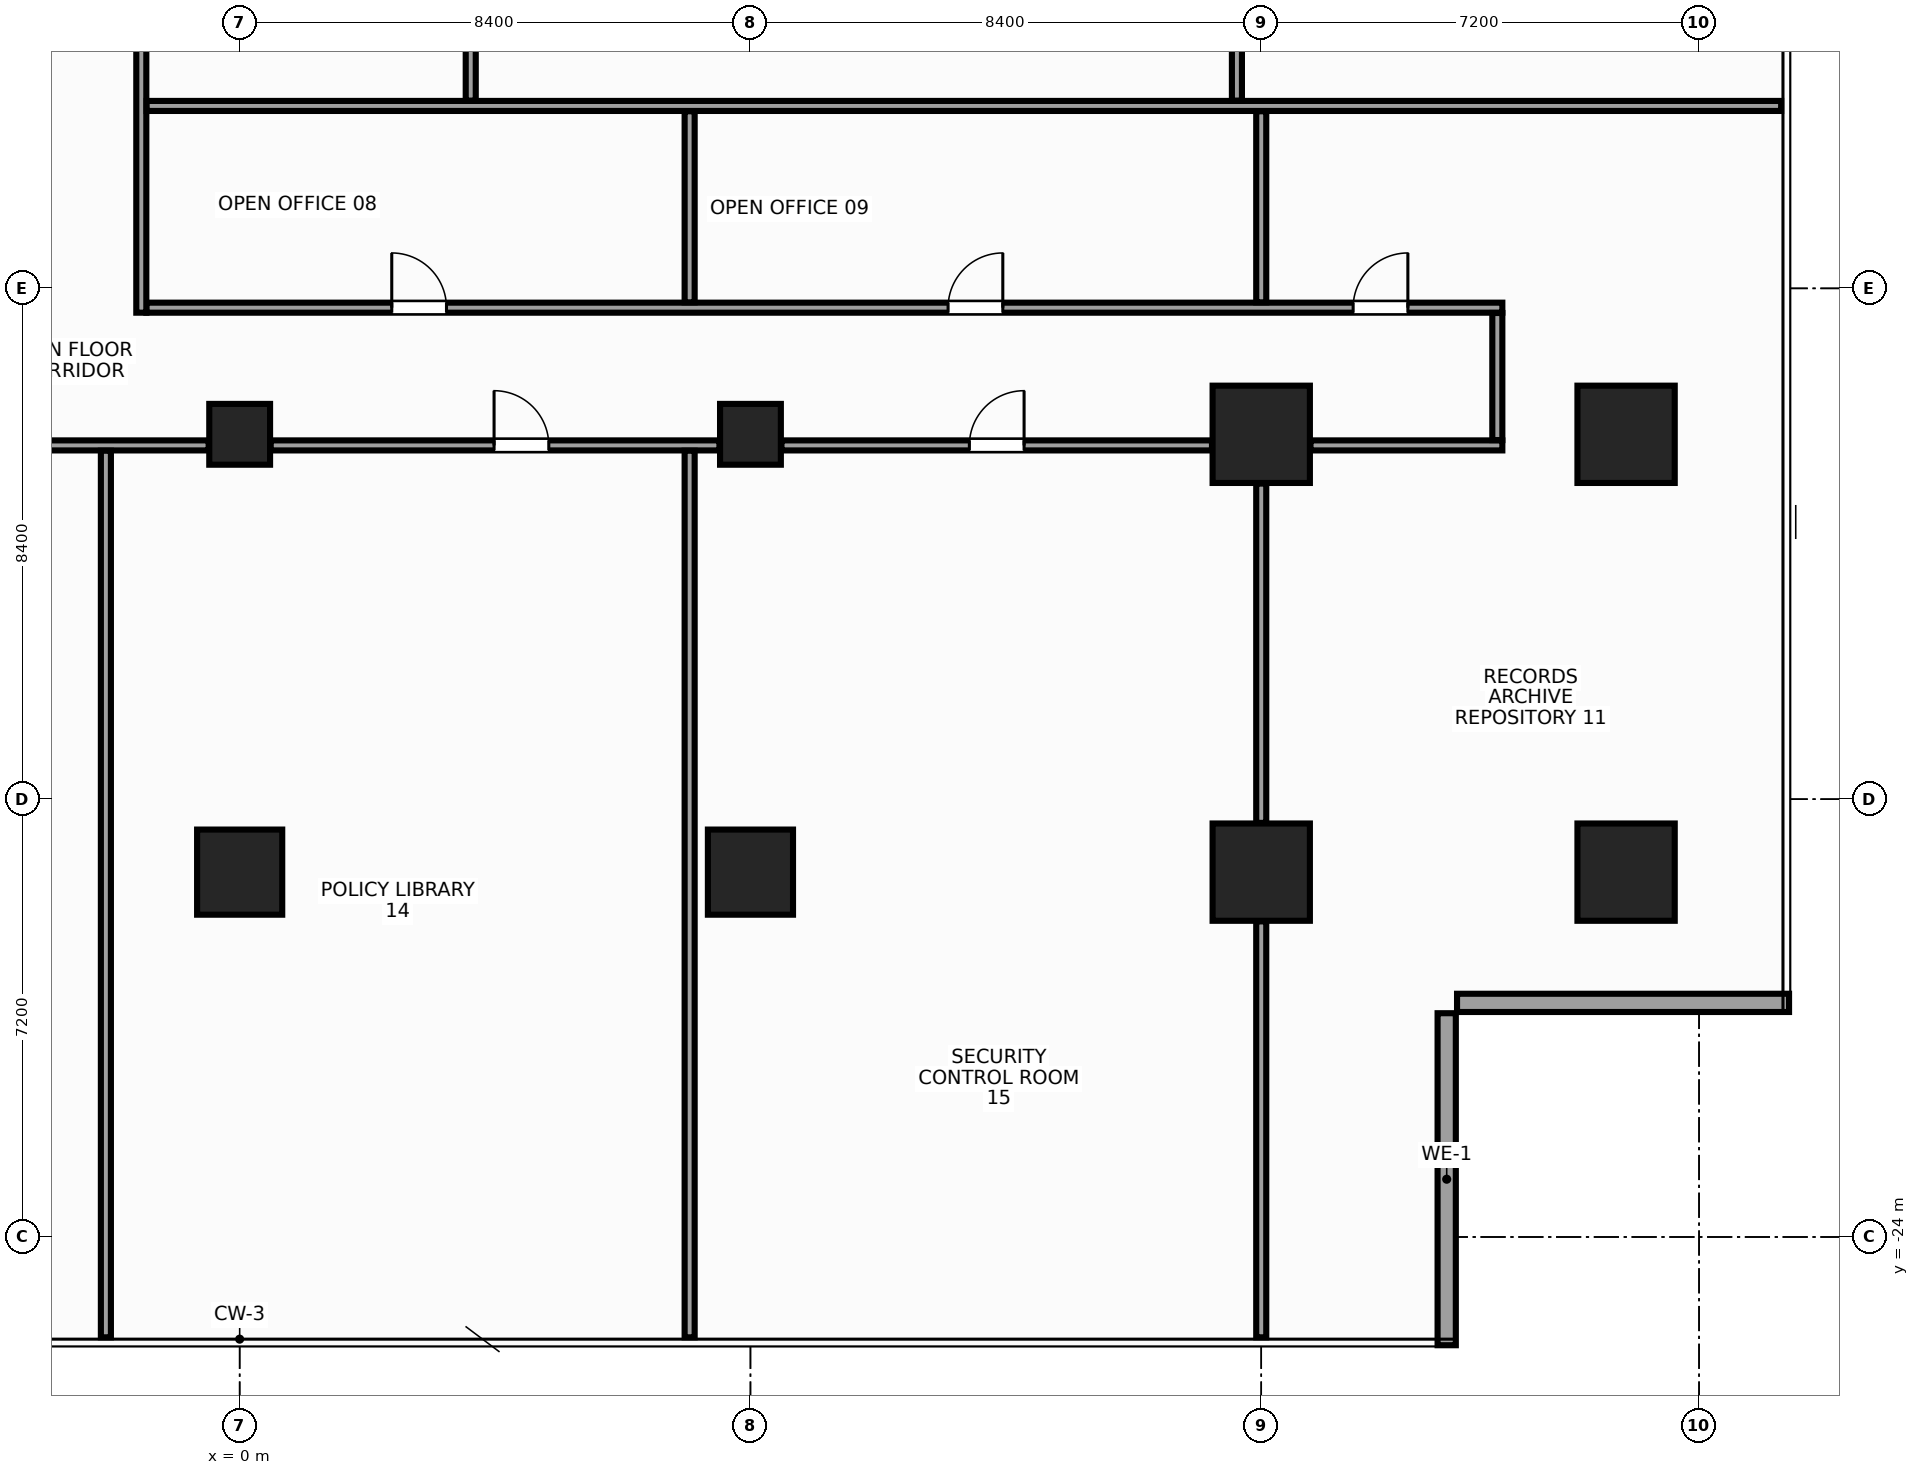
"""IFC4 building model, lengths in metres.
Left out: names, types, materials, properties, quantities, classifications, styles, units other than length and angle.
Written with IfcOpenShell. Run it as: python <this file> out.ifc"""

import sys

from ifc_helpers import new_model, si_unit, direction, frame, frame_2d, origin, origin_2d, place, context, subcontext, project, spatial, rectangle, hollow_rectangle, extrude, source, transform, mapped, element, fill, save


model = new_model("IFC4")
c1 = context("Model", 3, precision=1e-05, world=origin(), true_north=direction((0.0, 1.0)))
c2 = subcontext(c1, "Body", "Model", "MODEL_VIEW")
j1 = project(units=[si_unit("LENGTHUNIT", "METRE"), si_unit("PLANEANGLEUNIT", "RADIAN")], contexts=[c1])
p1 = place(None, origin())
s1 = spatial("IfcSite", under=j1, at=p1, CompositionType="ELEMENT")
p2 = place(p1, origin())
s2 = spatial("IfcBuilding", under=s1, at=p2, CompositionType="ELEMENT")
p3 = place(p2, frame((0.0, 0.0, 106.4)))
s3 = spatial("IfcBuildingStorey", under=s2, at=p3, CompositionType="ELEMENT", Elevation=106.4)
m1 = source(origin(), c2, "Body", "SweptSolid", [
    extrude(rectangle(XDim=1.6, YDim=1.6, at=origin_2d()), origin(), (0.0, 0.0, 1.0), 3.6),
])
for number, where, z_axis, x_axis in (
    (1, (16.8, -18.0, 0.0), (0.0, 0.0, 1.0), (1.0, 0.0, 0.0)),
    (2, (16.8, -10.8, 0.0), (0.0, 0.0, 1.0), (1.0, 0.0, 0.0)),
    (3, (22.8, -18.0, 0.0), (0.0, 0.0, 1.0), (1.0, 0.0, 0.0)),
    (4, (22.8, -10.8, 0.0), (0.0, 0.0, 1.0), (1.0, 0.0, 0.0)),
):
    element("IfcColumn", number, at=place(p3, frame(where, z_axis=z_axis, x_axis=x_axis)), inside=s3, PredefinedType="COLUMN", context=c2, shape_type="MappedRepresentation", body=[
        mapped(m1, transform((0.0, 0.0, 0.0), x_axis=(1.0, 0.0, 0.0), y_axis=(0.0, 1.0, 0.0), z_axis=(0.0, 0.0, 1.0), scale=1.0)),
    ])
m2 = source(origin(), c2, "Body", "SweptSolid", [
    extrude(rectangle(XDim=1.4, YDim=1.4, at=origin_2d()), origin(), (0.0, 0.0, 1.0), 3.6),
])
p4 = place(p3, frame((8.4, -18.0, 0.0), z_axis=(0.0, 0.0, 1.0), x_axis=(1.0, 0.0, 0.0)))
e5 = element("IfcColumn", 5, at=p4, inside=s3, PredefinedType="COLUMN", context=c2, shape_type="MappedRepresentation", body=[
    mapped(m2, transform((0.0, 0.0, 0.0), x_axis=(1.0, 0.0, 0.0), y_axis=(0.0, 1.0, 0.0), z_axis=(0.0, 0.0, 1.0), scale=1.0)),
])
m3 = source(origin(), c2, "Body", "SweptSolid", [
    extrude(hollow_rectangle(XDim=1.0, YDim=1.0, WallThickness=0.045, at=origin_2d()), origin(), (0.0, 0.0, 1.0), 3.6),
])
p5 = place(p3, frame((8.4, -10.8, 0.0), z_axis=(0.0, 0.0, 1.0), x_axis=(1.0, 0.0, 0.0)))
e6 = element("IfcColumn", 6, at=p5, inside=s3, PredefinedType="COLUMN", context=c2, shape_type="MappedRepresentation", body=[
    mapped(m3, transform((0.0, 0.0, 0.0), x_axis=(1.0, 0.0, 0.0), y_axis=(0.0, 1.0, 0.0), z_axis=(0.0, 0.0, 1.0), scale=1.0)),
])
p6 = place(p3, frame((0.0, -18.0, 0.0), z_axis=(0.0, 0.0, 1.0), x_axis=(1.0, 0.0, 0.0)))
e7 = element("IfcColumn", 7, at=p6, inside=s3, PredefinedType="COLUMN", context=c2, shape_type="MappedRepresentation", body=[
    mapped(m2, transform((0.0, 0.0, 0.0), x_axis=(1.0, 0.0, 0.0), y_axis=(0.0, 1.0, 0.0), z_axis=(0.0, 0.0, 1.0), scale=1.0)),
])
m4 = source(origin(), c2, "Body", "SweptSolid", [
    extrude(rectangle(XDim=1.0, YDim=1.0, at=origin_2d()), origin(), (0.0, 0.0, 1.0), 3.6),
])
p7 = place(p3, frame((0.0, -10.8, 0.0), z_axis=(0.0, 0.0, 1.0), x_axis=(1.0, 0.0, 0.0)))
e8 = element("IfcColumn", 8, at=p7, inside=s3, PredefinedType="COLUMN", context=c2, shape_type="MappedRepresentation", body=[
    mapped(m4, transform((0.0, 0.0, 0.0), x_axis=(1.0, 0.0, 0.0), y_axis=(0.0, 1.0, 0.0), z_axis=(0.0, 0.0, 1.0), scale=1.0)),
])
m5 = source(origin(), c2, "Body", "SweptSolid", [
    extrude(rectangle(XDim=5.46, YDim=0.3, at=frame_2d((2.73, 0.0))), origin(), (0.0, 0.0, 1.0), 2.74),
])
for number, where, z_axis, x_axis in (
    (9, (19.85, -25.78, 0.0), (0.0, 0.0, 1.0), (0.0, 1.0, 0.0)),
    (10, (20.02, -20.15, 0.0), (0.0, 0.0, 1.0), (1.0, 0.0, 0.0)),
):
    element("IfcWall", number, at=place(p3, frame(where, z_axis=z_axis, x_axis=x_axis)), inside=s3, PredefinedType="STANDARD", context=c2, shape_type="MappedRepresentation", body=[
        mapped(m5, transform((0.0, 0.0, 0.0), x_axis=(1.0, 0.0, 0.0), y_axis=(0.0, 1.0, 0.0), z_axis=(0.0, 0.0, 1.0), scale=1.0)),
    ])
m6 = source(origin(), c2, "Body", "SweptSolid", [
    extrude(rectangle(XDim=22.3, YDim=0.165, at=frame_2d((11.15, 0.0))), origin(), (0.0, 0.0, 1.0), 2.745),
])
p8 = place(p3, frame((-1.535, -8.718, 0.0), z_axis=(0.0, 0.0, 1.0), x_axis=(1.0, 0.0, 0.0)))
e11 = element("IfcWall", 11, at=p8, inside=s3, PredefinedType="PARTITIONING", context=c2, shape_type="MappedRepresentation", body=[
    mapped(m6, transform((0.0, 0.0, 0.0), x_axis=(1.0, 0.0, 0.0), y_axis=(0.0, 1.0, 0.0), z_axis=(0.0, 0.0, 1.0), scale=1.0)),
])
p9 = place(p8, frame((4.036, 0.0, 0.0)))
e12 = element("IfcOpeningElement", 12, at=p9, cuts=e11, PredefinedType="OPENING", context=c2, shape_type="SweptSolid", body=[
    extrude(rectangle(XDim=0.9, YDim=2.15, at=frame_2d((0.45, 1.075))), frame((0.0, 0.094, 0.0), z_axis=(0.0, -1.0, 0.0), x_axis=(1.0, 0.0, 0.0)), (0.0, 0.0, 1.0), 0.189),
])
p10 = place(p8, frame((13.185, 0.0, 0.0)))
e13 = element("IfcOpeningElement", 13, at=p10, cuts=e11, PredefinedType="OPENING", context=c2, shape_type="SweptSolid", body=[
    extrude(rectangle(XDim=0.9, YDim=2.15, at=frame_2d((0.45, 1.075))), frame((0.0, 0.094, 0.0), z_axis=(0.0, -1.0, 0.0), x_axis=(1.0, 0.0, 0.0)), (0.0, 0.0, 1.0), 0.189),
])
p11 = place(p8, frame((19.846, 0.0, 0.0)))
e14 = element("IfcOpeningElement", 14, at=p11, cuts=e11, PredefinedType="OPENING", context=c2, shape_type="SweptSolid", body=[
    extrude(rectangle(XDim=0.9, YDim=2.15, at=frame_2d((0.45, 1.075))), frame((0.0, 0.094, 0.0), z_axis=(0.0, -1.0, 0.0), x_axis=(1.0, 0.0, 0.0)), (0.0, 0.0, 1.0), 0.189),
])
m7 = source(origin(), c2, "Body", "SweptSolid", [
    extrude(rectangle(XDim=7.38, YDim=0.165, at=frame_2d((3.69, 0.0))), origin(), (0.0, 0.0, 1.0), 2.745),
])
p12 = place(p3, frame((-7.89, -10.982, 0.0), z_axis=(0.0, 0.0, 1.0), x_axis=(1.0, 0.0, 0.0)))
e15 = element("IfcWall", 15, at=p12, inside=s3, PredefinedType="PARTITIONING", context=c2, shape_type="MappedRepresentation", body=[
    mapped(m7, transform((0.0, 0.0, 0.0), x_axis=(1.0, 0.0, 0.0), y_axis=(0.0, 1.0, 0.0), z_axis=(0.0, 0.0, 1.0), scale=1.0)),
])
p13 = place(p3, frame((0.51, -10.982, 0.0), z_axis=(0.0, 0.0, 1.0), x_axis=(1.0, 0.0, 0.0)))
e16 = element("IfcWall", 16, at=p13, inside=s3, PredefinedType="PARTITIONING", context=c2, shape_type="MappedRepresentation", body=[
    mapped(m7, transform((0.0, 0.0, 0.0), x_axis=(1.0, 0.0, 0.0), y_axis=(0.0, 1.0, 0.0), z_axis=(0.0, 0.0, 1.0), scale=1.0)),
])
p14 = place(p13, frame((3.674, 0.0, 0.0)))
e17 = element("IfcOpeningElement", 17, at=p14, cuts=e16, PredefinedType="OPENING", context=c2, shape_type="SweptSolid", body=[
    extrude(rectangle(XDim=0.9, YDim=2.15, at=frame_2d((0.45, 1.075))), frame((0.0, 0.094, 0.0), z_axis=(0.0, -1.0, 0.0), x_axis=(1.0, 0.0, 0.0)), (0.0, 0.0, 1.0), 0.189),
])
m8 = source(origin(), c2, "Body", "SweptSolid", [
    extrude(rectangle(XDim=7.08, YDim=0.165, at=frame_2d((3.54, 0.0))), origin(), (0.0, 0.0, 1.0), 2.745),
])
p15 = place(p3, frame((8.91, -10.982, 0.0), z_axis=(0.0, 0.0, 1.0), x_axis=(1.0, 0.0, 0.0)))
e18 = element("IfcWall", 18, at=p15, inside=s3, PredefinedType="PARTITIONING", context=c2, shape_type="MappedRepresentation", body=[
    mapped(m8, transform((0.0, 0.0, 0.0), x_axis=(1.0, 0.0, 0.0), y_axis=(0.0, 1.0, 0.0), z_axis=(0.0, 0.0, 1.0), scale=1.0)),
])
p16 = place(p15, frame((3.09, 0.0, 0.0)))
e19 = element("IfcOpeningElement", 19, at=p16, cuts=e18, PredefinedType="OPENING", context=c2, shape_type="SweptSolid", body=[
    extrude(rectangle(XDim=0.9, YDim=2.15, at=frame_2d((0.45, 1.075))), frame((0.0, 0.094, 0.0), z_axis=(0.0, -1.0, 0.0), x_axis=(1.0, 0.0, 0.0)), (0.0, 0.0, 1.0), 0.189),
])
m9 = source(origin(), c2, "Body", "SweptSolid", [
    extrude(rectangle(XDim=3.155, YDim=0.165, at=frame_2d((1.577, 0.0))), origin(), (0.0, 0.0, 1.0), 2.745),
])
p17 = place(p3, frame((17.61, -10.982, 0.0), z_axis=(0.0, 0.0, 1.0), x_axis=(1.0, 0.0, 0.0)))
e20 = element("IfcWall", 20, at=p17, inside=s3, PredefinedType="PARTITIONING", context=c2, shape_type="MappedRepresentation", body=[
    mapped(m9, transform((0.0, 0.0, 0.0), x_axis=(1.0, 0.0, 0.0), y_axis=(0.0, 1.0, 0.0), z_axis=(0.0, 0.0, 1.0), scale=1.0)),
])
m10 = source(origin(), c2, "Body", "SweptSolid", [
    extrude(rectangle(XDim=16.6, YDim=0.165, at=frame_2d((8.3, 0.0))), origin(), (0.0, 0.0, 1.0), 2.645),
])
p18 = place(p3, frame((-1.617, -8.8, 0.0), z_axis=(0.0, 0.0, 1.0), x_axis=(0.0, 1.0, 0.0)))
e21 = element("IfcWall", 21, at=p18, inside=s3, PredefinedType="PARTITIONING", context=c2, shape_type="MappedRepresentation", body=[
    mapped(m10, transform((0.0, 0.0, 0.0), x_axis=(1.0, 0.0, 0.0), y_axis=(0.0, 1.0, 0.0), z_axis=(0.0, 0.0, 1.0), scale=1.0)),
])
m11 = source(origin(), c2, "Body", "SweptSolid", [
    extrude(rectangle(XDim=2.09, YDim=0.165, at=frame_2d((1.045, 0.0))), origin(), (0.0, 0.0, 1.0), 3.36),
])
p19 = place(p3, frame((20.683, -10.895, 0.0), z_axis=(0.0, 0.0, 1.0), x_axis=(0.0, 1.0, 0.0)))
e22 = element("IfcWall", 22, at=p19, inside=s3, PredefinedType="PARTITIONING", context=c2, shape_type="MappedRepresentation", body=[
    mapped(m11, transform((0.0, 0.0, 0.0), x_axis=(1.0, 0.0, 0.0), y_axis=(0.0, 1.0, 0.0), z_axis=(0.0, 0.0, 1.0), scale=1.0)),
])
m12 = source(origin(), c2, "Body", "SweptSolid", [
    extrude(rectangle(XDim=26.88, YDim=0.165, at=frame_2d((13.44, 0.0))), origin(), (0.0, 0.0, 1.0), 2.745),
])
p20 = place(p3, frame((-1.53, -5.4, 0.0), z_axis=(0.0, 0.0, 1.0), x_axis=(1.0, 0.0, 0.0)))
e23 = element("IfcWall", 23, at=p20, inside=s3, PredefinedType="PARTITIONING", context=c2, shape_type="MappedRepresentation", body=[
    mapped(m12, transform((0.0, 0.0, 0.0), x_axis=(1.0, 0.0, 0.0), y_axis=(0.0, 1.0, 0.0), z_axis=(0.0, 0.0, 1.0), scale=1.0)),
])
m13 = source(origin(), c2, "Body", "SweptSolid", [
    extrude(rectangle(XDim=12.942, YDim=0.165, at=frame_2d((6.471, 0.0))), origin(), (0.0, 0.0, 1.0), 2.645),
])
p21 = place(p3, frame((3.8, -5.312, 0.0), z_axis=(0.0, 0.0, 1.0), x_axis=(0.0, 1.0, 0.0)))
e24 = element("IfcWall", 24, at=p21, inside=s3, PredefinedType="PARTITIONING", context=c2, shape_type="MappedRepresentation", body=[
    mapped(m13, transform((0.0, 0.0, 0.0), x_axis=(1.0, 0.0, 0.0), y_axis=(0.0, 1.0, 0.0), z_axis=(0.0, 0.0, 1.0), scale=1.0)),
])
m14 = source(origin(), c2, "Body", "SweptSolid", [
    extrude(rectangle(XDim=4.502, YDim=0.165, at=frame_2d((2.251, 0.0))), origin(), (0.0, 0.0, 1.0), 3.36),
])
p22 = place(p3, frame((16.4, -5.312, 0.0), z_axis=(0.0, 0.0, 1.0), x_axis=(0.0, 1.0, 0.0)))
e25 = element("IfcWall", 25, at=p22, inside=s3, PredefinedType="PARTITIONING", context=c2, shape_type="MappedRepresentation", body=[
    mapped(m14, transform((0.0, 0.0, 0.0), x_axis=(1.0, 0.0, 0.0), y_axis=(0.0, 1.0, 0.0), z_axis=(0.0, 0.0, 1.0), scale=1.0)),
])
m15 = source(origin(), c2, "Body", "SweptSolid", [
    extrude(rectangle(XDim=14.58, YDim=0.165, at=frame_2d((7.29, 0.0))), origin(), (0.0, 0.0, 1.0), 2.745),
])
for number, where, z_axis, x_axis in (
    (26, (-2.2, -25.65, 0.0), (0.0, 0.0, 1.0), (0.0, 1.0, 0.0)),
    (27, (7.4, -25.65, 0.0), (0.0, 0.0, 1.0), (0.0, 1.0, 0.0)),
):
    element("IfcWall", number, at=place(p3, frame(where, z_axis=z_axis, x_axis=x_axis)), inside=s3, PredefinedType="PARTITIONING", context=c2, shape_type="MappedRepresentation", body=[
        mapped(m15, transform((0.0, 0.0, 0.0), x_axis=(1.0, 0.0, 0.0), y_axis=(0.0, 1.0, 0.0), z_axis=(0.0, 0.0, 1.0), scale=1.0)),
    ])
m16 = source(origin(), c2, "Body", "SweptSolid", [
    extrude(rectangle(XDim=3.142, YDim=0.165, at=frame_2d((1.571, 0.0))), origin(), (0.0, 0.0, 1.0), 3.36),
])
p23 = place(p3, frame((7.4, -8.63, 0.0), z_axis=(0.0, 0.0, 1.0), x_axis=(0.0, 1.0, 0.0)))
e28 = element("IfcWall", 28, at=p23, inside=s3, PredefinedType="PARTITIONING", context=c2, shape_type="MappedRepresentation", body=[
    mapped(m16, transform((0.0, 0.0, 0.0), x_axis=(1.0, 0.0, 0.0), y_axis=(0.0, 1.0, 0.0), z_axis=(0.0, 0.0, 1.0), scale=1.0)),
])
m17 = source(origin(), c2, "Body", "SweptSolid", [
    extrude(rectangle(XDim=6.84, YDim=0.165, at=frame_2d((3.42, 0.0))), origin(), (0.0, 0.0, 1.0), 3.36),
])
p24 = place(p3, frame((16.8, -25.65, 0.0), z_axis=(0.0, 0.0, 1.0), x_axis=(0.0, 1.0, 0.0)))
e29 = element("IfcWall", 29, at=p24, inside=s3, PredefinedType="PARTITIONING", context=c2, shape_type="MappedRepresentation", body=[
    mapped(m17, transform((0.0, 0.0, 0.0), x_axis=(1.0, 0.0, 0.0), y_axis=(0.0, 1.0, 0.0), z_axis=(0.0, 0.0, 1.0), scale=1.0)),
])
m18 = source(origin(), c2, "Body", "SweptSolid", [
    extrude(rectangle(XDim=5.58, YDim=0.165, at=frame_2d((2.79, 0.0))), origin(), (0.0, 0.0, 1.0), 2.945),
])
p25 = place(p3, frame((16.8, -17.19, 0.0), z_axis=(0.0, 0.0, 1.0), x_axis=(0.0, 1.0, 0.0)))
e30 = element("IfcWall", 30, at=p25, inside=s3, PredefinedType="PARTITIONING", context=c2, shape_type="MappedRepresentation", body=[
    mapped(m18, transform((0.0, 0.0, 0.0), x_axis=(1.0, 0.0, 0.0), y_axis=(0.0, 1.0, 0.0), z_axis=(0.0, 0.0, 1.0), scale=1.0)),
])
m19 = source(origin(), c2, "Body", "SweptSolid", [
    extrude(rectangle(XDim=3.142, YDim=0.165, at=frame_2d((1.571, 0.0))), origin(), (0.0, 0.0, 1.0), 2.745),
])
p26 = place(p3, frame((16.8, -8.63, 0.0), z_axis=(0.0, 0.0, 1.0), x_axis=(0.0, 1.0, 0.0)))
e31 = element("IfcWall", 31, at=p26, inside=s3, PredefinedType="PARTITIONING", context=c2, shape_type="MappedRepresentation", body=[
    mapped(m19, transform((0.0, 0.0, 0.0), x_axis=(1.0, 0.0, 0.0), y_axis=(0.0, 1.0, 0.0), z_axis=(0.0, 0.0, 1.0), scale=1.0)),
])
m20 = source(origin(), c2, "Body", "SweptSolid", [
    extrude(rectangle(XDim=0.9, YDim=2.15, at=frame_2d((0.45, 1.075))), frame((0.0, 0.025, 0.0), z_axis=(0.0, -1.0, 0.0), x_axis=(1.0, 0.0, 0.0)), (0.0, 0.0, 1.0), 0.05),
])
p27 = place(p9, origin())
e32 = element("IfcDoor", 32, at=p27, inside=s3, OperationType="SINGLE_SWING_LEFT", PredefinedType="DOOR", context=c2, shape_type="MappedRepresentation", body=[
    mapped(m20, transform((0.0, 0.0, 0.0), x_axis=(1.0, 0.0, 0.0), y_axis=(0.0, 1.0, 0.0), z_axis=(0.0, 0.0, 1.0), scale=1.0)),
])
fill(e12, e32)
p28 = place(p10, origin())
e33 = element("IfcDoor", 33, at=p28, inside=s3, OperationType="SINGLE_SWING_RIGHT", PredefinedType="DOOR", context=c2, shape_type="MappedRepresentation", body=[
    mapped(m20, transform((0.0, 0.0, 0.0), x_axis=(1.0, 0.0, 0.0), y_axis=(0.0, 1.0, 0.0), z_axis=(0.0, 0.0, 1.0), scale=1.0)),
])
fill(e13, e33)
p29 = place(p11, origin())
e34 = element("IfcDoor", 34, at=p29, inside=s3, OperationType="SINGLE_SWING_RIGHT", PredefinedType="DOOR", context=c2, shape_type="MappedRepresentation", body=[
    mapped(m20, transform((0.0, 0.0, 0.0), x_axis=(1.0, 0.0, 0.0), y_axis=(0.0, 1.0, 0.0), z_axis=(0.0, 0.0, 1.0), scale=1.0)),
])
fill(e14, e34)
p30 = place(p14, origin())
e35 = element("IfcDoor", 35, at=p30, inside=s3, OperationType="SINGLE_SWING_LEFT", PredefinedType="DOOR", context=c2, shape_type="MappedRepresentation", body=[
    mapped(m20, transform((0.0, 0.0, 0.0), x_axis=(1.0, 0.0, 0.0), y_axis=(0.0, 1.0, 0.0), z_axis=(0.0, 0.0, 1.0), scale=1.0)),
])
fill(e17, e35)
p31 = place(p16, origin())
e36 = element("IfcDoor", 36, at=p31, inside=s3, OperationType="SINGLE_SWING_RIGHT", PredefinedType="DOOR", context=c2, shape_type="MappedRepresentation", body=[
    mapped(m20, transform((0.0, 0.0, 0.0), x_axis=(1.0, 0.0, 0.0), y_axis=(0.0, 1.0, 0.0), z_axis=(0.0, 0.0, 1.0), scale=1.0)),
])
fill(e19, e36)
save(model, sys.argv[1])
